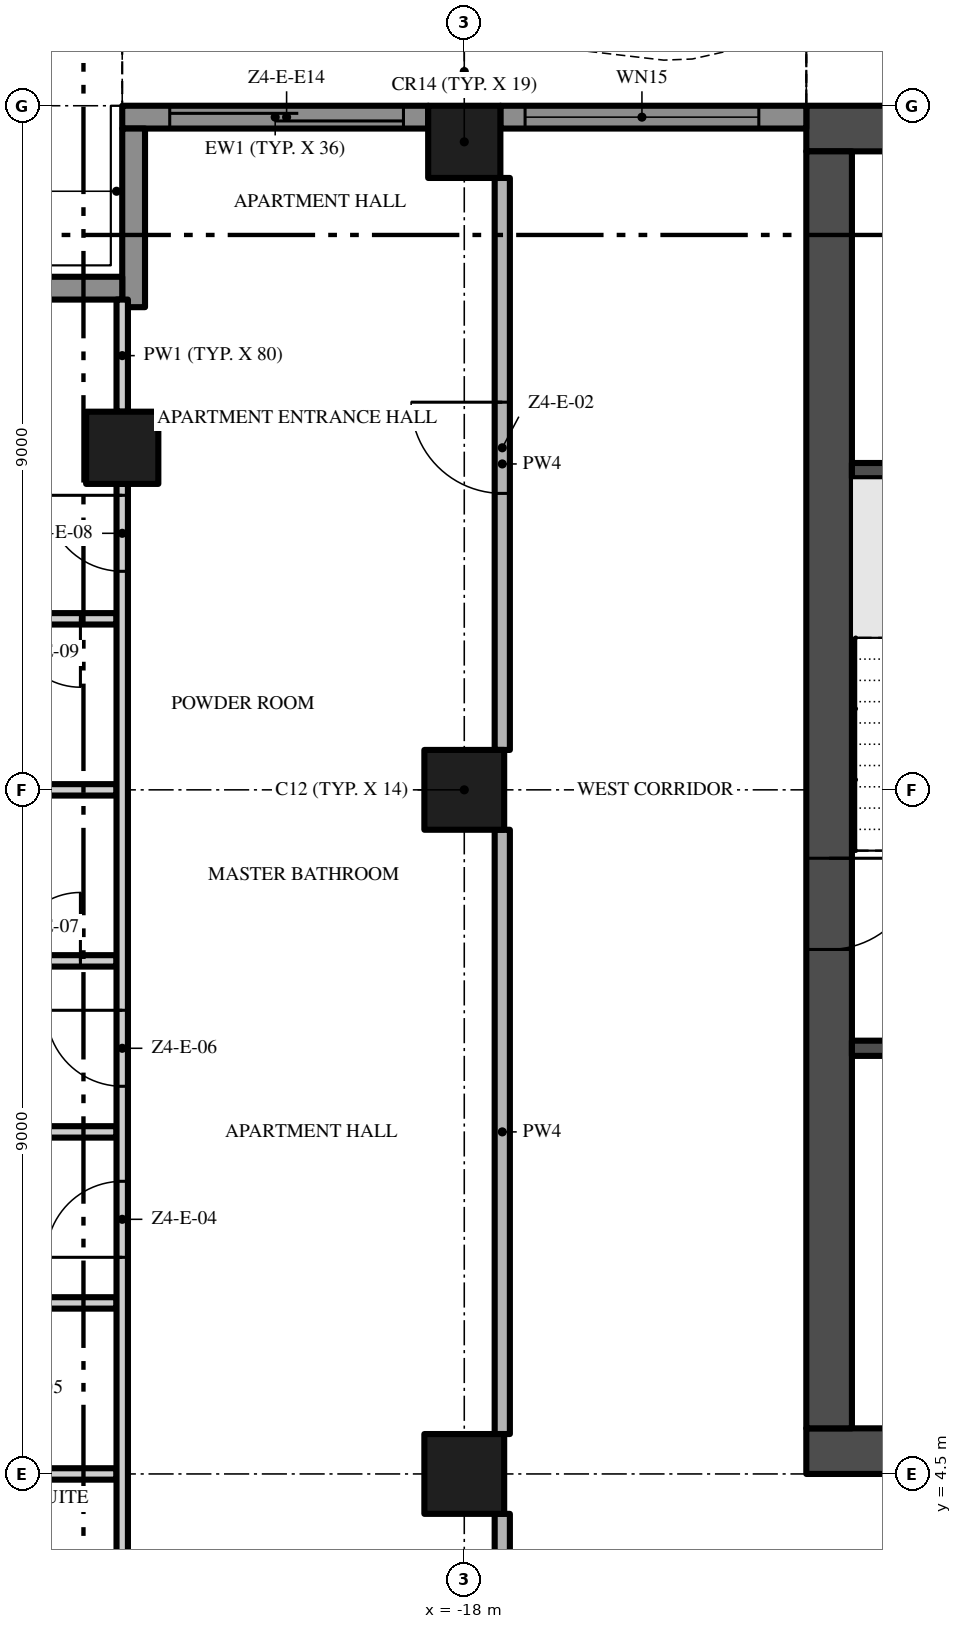
"""IFC4 building model, lengths in metres.
Left out: names, types, materials, properties, quantities, classifications, styles, units other than length and angle.
Written with IfcOpenShell. Run it as: python <this file> out.ifc"""

import sys

from ifc_helpers import new_model, si_unit, direction, frame, frame_2d, origin, origin_2d, place, context, subcontext, project, spatial, polyline, rectangle, outline, extrude, element, fill, save


model = new_model("IFC4")
c1 = context("Model", 3, precision=1e-05, world=origin(), true_north=direction((0.0, 1.0)))
c2 = subcontext(c1, "Body", "Model", "MODEL_VIEW")
j1 = project(units=[si_unit("LENGTHUNIT", "METRE"), si_unit("PLANEANGLEUNIT", "RADIAN")], contexts=[c1])
p1 = place(None, origin())
s1 = spatial("IfcSite", under=j1, at=p1, CompositionType="ELEMENT")
p2 = place(p1, origin())
s2 = spatial("IfcBuilding", under=s1, at=p2, CompositionType="ELEMENT")
p3 = place(p2, frame((0.0, 0.0, 230.0)))
s3 = spatial("IfcBuildingStorey", under=s2, at=p3, CompositionType="ELEMENT", Elevation=230.0)
p4 = place(p3, frame((-13.5, 4.8, -0.3), z_axis=(0.0, 0.0, 1.0), x_axis=(1.0, 0.0, 0.0)))
e1 = element("IfcWall", 1, at=p4, inside=s3, PredefinedType="SHEAR", context=c2, shape_type="SweptSolid", body=[
    extrude(rectangle(XDim=27.0, YDim=0.6, at=frame_2d((13.5, 0.0))), origin(), (0.0, 0.0, 1.0), 3.8),
])
p5 = place(p4, frame((12.0, 0.0, 0.3)))
e2 = element("IfcOpeningElement", 2, at=p5, cuts=e1, PredefinedType="OPENING", context=c2, shape_type="SweptSolid", body=[
    extrude(rectangle(XDim=3.0, YDim=2.4, at=frame_2d((1.5, 1.2))), frame((0.0, 0.31, 0.0), z_axis=(0.0, -1.0, 0.0), x_axis=(1.0, 0.0, 0.0)), (0.0, 0.0, 1.0), 0.62),
])
p6 = place(p4, frame((4.9, 0.0, 0.3)))
e3 = element("IfcOpeningElement", 3, at=p6, cuts=e1, PredefinedType="OPENING", context=c2, shape_type="SweptSolid", body=[
    extrude(rectangle(XDim=1.2, YDim=2.2, at=frame_2d((0.6, 1.1))), frame((0.0, 0.31, 0.0), z_axis=(0.0, -1.0, 0.0), x_axis=(1.0, 0.0, 0.0)), (0.0, 0.0, 1.0), 0.62),
])
p7 = place(p4, frame((20.75, 0.0, 0.3)))
e4 = element("IfcOpeningElement", 4, at=p7, cuts=e1, PredefinedType="OPENING", context=c2, shape_type="SweptSolid", body=[
    extrude(rectangle(XDim=1.5, YDim=2.2, at=frame_2d((0.75, 1.1))), frame((0.0, 0.31, 0.0), z_axis=(0.0, -1.0, 0.0), x_axis=(1.0, 0.0, 0.0)), (0.0, 0.0, 1.0), 0.62),
])
p8 = place(p4, frame((17.4, 0.0, 0.3)))
e5 = element("IfcOpeningElement", 5, at=p8, cuts=e1, PredefinedType="OPENING", context=c2, shape_type="SweptSolid", body=[
    extrude(rectangle(XDim=1.2, YDim=2.2, at=frame_2d((0.6, 1.1))), frame((0.0, 0.31, 0.0), z_axis=(0.0, -1.0, 0.0), x_axis=(1.0, 0.0, 0.0)), (0.0, 0.0, 1.0), 0.62),
])
p9 = place(p3, frame((13.5, 22.2, -0.3), z_axis=(0.0, 0.0, 1.0), x_axis=(-1.0, 0.0, 0.0)))
e6 = element("IfcWall", 6, at=p9, inside=s3, PredefinedType="SHEAR", context=c2, shape_type="SweptSolid", body=[
    extrude(rectangle(XDim=27.0, YDim=0.6, at=frame_2d((13.5, 0.0))), origin(), (0.0, 0.0, 1.0), 3.8),
])
p10 = place(p3, frame((-13.2, 21.9, -0.3), z_axis=(0.0, 0.0, 1.0), x_axis=(0.0, -1.0, 0.0)))
e7 = element("IfcWall", 7, at=p10, inside=s3, PredefinedType="SHEAR", context=c2, shape_type="SweptSolid", body=[
    extrude(rectangle(XDim=16.8, YDim=0.6, at=frame_2d((8.4, 0.0))), origin(), (0.0, 0.0, 1.0), 3.8),
])
p11 = place(p10, frame((9.3, 0.0, 0.3)))
e8 = element("IfcOpeningElement", 8, at=p11, cuts=e7, PredefinedType="OPENING", context=c2, shape_type="SweptSolid", body=[
    extrude(rectangle(XDim=1.2, YDim=2.2, at=frame_2d((0.6, 1.1))), frame((0.0, 0.31, 0.0), z_axis=(0.0, -1.0, 0.0), x_axis=(1.0, 0.0, 0.0)), (0.0, 0.0, 1.0), 0.62),
])
p12 = place(p3, frame((-18.0, 13.5, 0.0), z_axis=(0.0, 0.0, 1.0), x_axis=(1.0, 0.0, 0.0)))
e9 = element("IfcColumn", 9, at=p12, inside=s3, PredefinedType="COLUMN", context=c2, shape_type="SweptSolid", body=[
    extrude(rectangle(XDim=1.05, YDim=1.05, at=origin_2d()), origin(), (0.0, 0.0, 1.0), 3.5),
])
p13 = place(p3, frame((-18.0, 22.025, 0.0), z_axis=(0.0, 0.0, 1.0), x_axis=(1.0, 0.0, 0.0)))
e10 = element("IfcColumn", 10, at=p13, inside=s3, PredefinedType="COLUMN", context=c2, shape_type="SweptSolid", body=[
    extrude(rectangle(XDim=0.95, YDim=0.95, at=origin_2d()), origin(), (0.0, 0.0, 1.0), 3.5),
])
p14 = place(p3, frame((-18.0, 4.5, 0.0), z_axis=(0.0, 0.0, 1.0), x_axis=(1.0, 0.0, 0.0)))
e11 = element("IfcColumn", 11, at=p14, inside=s3, PredefinedType="COLUMN", context=c2, shape_type="SweptSolid", body=[
    extrude(rectangle(XDim=1.05, YDim=1.05, at=origin_2d()), origin(), (0.0, 0.0, 1.0), 3.5),
])
p15 = place(p3, frame((-22.5, 18.0, 0.0), z_axis=(0.0, 0.0, 1.0), x_axis=(1.0, 0.0, 0.0)))
e12 = element("IfcColumn", 12, at=p15, inside=s3, PredefinedType="COLUMN", context=c2, shape_type="SweptSolid", body=[
    extrude(rectangle(XDim=0.95, YDim=0.95, at=origin_2d()), origin(), (0.0, 0.0, 1.0), 3.5),
])
p16 = place(p3, frame((-17.525, 22.35, 0.0), z_axis=(0.0, 0.0, 1.0), x_axis=(1.0, 0.0, 0.0)))
e13 = element("IfcWall", 13, at=p16, inside=s3, PredefinedType="SOLIDWALL", context=c2, shape_type="SweptSolid", body=[
    extrude(rectangle(XDim=4.025, YDim=0.3, at=frame_2d((2.013, 0.0))), origin(), (0.0, 0.0, 1.0), 3.5),
])
p17 = place(p16, frame((0.325, 0.0, 0.45)))
e14 = element("IfcOpeningElement", 14, at=p17, cuts=e13, PredefinedType="OPENING", context=c2, shape_type="SweptSolid", body=[
    extrude(rectangle(XDim=3.075, YDim=2.65, at=frame_2d((1.538, 1.325))), frame((0.0, 0.16, 0.0), z_axis=(0.0, -1.0, 0.0), x_axis=(1.0, 0.0, 0.0)), (0.0, 0.0, 1.0), 0.32),
])
p18 = place(p3, frame((-22.5, 22.35, 0.0), z_axis=(0.0, 0.0, 1.0), x_axis=(1.0, 0.0, 0.0)))
e15 = element("IfcWall", 15, at=p18, inside=s3, PredefinedType="SOLIDWALL", context=c2, shape_type="SweptSolid", body=[
    extrude(rectangle(XDim=4.025, YDim=0.3, at=frame_2d((2.013, 0.0))), origin(), (0.0, 0.0, 1.0), 3.5),
])
p19 = place(p18, frame((0.625, 0.0, 0.0)))
e16 = element("IfcOpeningElement", 16, at=p19, cuts=e15, PredefinedType="OPENING", context=c2, shape_type="SweptSolid", body=[
    extrude(rectangle(XDim=3.075, YDim=2.4, at=frame_2d((1.538, 1.2))), frame((0.0, 0.16, 0.0), z_axis=(0.0, -1.0, 0.0), x_axis=(1.0, 0.0, 0.0)), (0.0, 0.0, 1.0), 0.32),
])
p20 = place(p3, frame((-22.35, 19.85, 0.0), z_axis=(0.0, 0.0, 1.0), x_axis=(0.0, 1.0, 0.0)))
e17 = element("IfcWall", 17, at=p20, inside=s3, PredefinedType="SOLIDWALL", context=c2, shape_type="SweptSolid", body=[
    extrude(rectangle(XDim=2.35, YDim=0.3, at=frame_2d((1.175, 0.0))), origin(), (0.0, 0.0, 1.0), 3.5),
])
p21 = place(p3, frame((-24.75, 20.1, 0.0), z_axis=(0.0, 0.0, 1.0), x_axis=(1.0, 0.0, 0.0)))
e18 = element("IfcWall", 18, at=p21, inside=s3, PredefinedType="SOLIDWALL", context=c2, shape_type="SweptSolid", body=[
    extrude(rectangle(XDim=2.25, YDim=0.3, at=frame_2d((1.125, 0.0))), origin(), (0.0, 0.0, 1.0), 3.5),
])
p22 = place(p3, origin())
e19 = element("IfcWall", 19, at=p22, inside=s3, PredefinedType="USERDEFINED", context=c2, shape_type="SweptSolid", body=[
    extrude(outline(polyline([(-13.5, 23.451), (-15.0, 23.115), (-15.375, 23.1), (-16.5, 23.231), (-18.0, 23.755), (-19.5, 24.488), (-21.0, 25.149), (-22.5, 25.485), (-22.555, 25.241), (-21.079, 24.91), (-19.605, 24.261), (-18.096, 23.524), (-16.556, 22.986), (-15.385, 22.849), (-14.967, 22.866), (-13.445, 23.208), (-13.5, 23.451)])), origin(), (0.0, 0.0, 1.0), 0.9),
])
for number, where, z_axis, x_axis in (
    (20, (-12.9, 10.1, 0.0), (0.0, 0.0, 1.0), (1.0, 0.0, 0.0)),
    (21, (-12.9, 17.7, 0.0), (0.0, 0.0, 1.0), (1.0, 0.0, 0.0)),
):
    element("IfcWall", number, at=place(p3, frame(where, z_axis=z_axis, x_axis=x_axis)), inside=s3, PredefinedType="SHEAR", context=c2, shape_type="SweptSolid", body=[
        extrude(rectangle(XDim=3.25, YDim=0.2, at=frame_2d((1.625, 0.0))), origin(), (0.0, 0.0, 1.0), 3.5),
    ])
p23 = place(p3, frame((-26.05, 4.5, 0.0), z_axis=(0.0, 0.0, 1.0), x_axis=(1.0, 0.0, 0.0)))
e22 = element("IfcWall", 22, at=p23, inside=s3, PredefinedType="PARTITIONING", context=c2, shape_type="SweptSolid", body=[
    extrude(rectangle(XDim=3.475, YDim=0.15, at=frame_2d((1.738, 0.0))), origin(), (0.0, 0.0, 1.0), 3.5),
])
p24 = place(p3, frame((-24.45, 6.75, 0.0), z_axis=(0.0, 0.0, 1.0), x_axis=(1.0, 0.0, 0.0)))
e23 = element("IfcWall", 23, at=p24, inside=s3, PredefinedType="PARTITIONING", context=c2, shape_type="SweptSolid", body=[
    extrude(rectangle(XDim=1.875, YDim=0.15, at=frame_2d((0.938, 0.0))), origin(), (0.0, 0.0, 1.0), 3.5),
])
p25 = place(p3, frame((-26.7, 9.0, 0.0), z_axis=(0.0, 0.0, 1.0), x_axis=(1.0, 0.0, 0.0)))
e24 = element("IfcWall", 24, at=p25, inside=s3, PredefinedType="PARTITIONING", context=c2, shape_type="SweptSolid", body=[
    extrude(rectangle(XDim=4.125, YDim=0.15, at=frame_2d((2.062, 0.0))), origin(), (0.0, 0.0, 1.0), 3.5),
])
p26 = place(p3, frame((-24.45, 11.25, 0.0), z_axis=(0.0, 0.0, 1.0), x_axis=(1.0, 0.0, 0.0)))
e25 = element("IfcWall", 25, at=p26, inside=s3, PredefinedType="PARTITIONING", context=c2, shape_type="SweptSolid", body=[
    extrude(rectangle(XDim=1.875, YDim=0.15, at=frame_2d((0.938, 0.0))), origin(), (0.0, 0.0, 1.0), 3.5),
])
p27 = place(p26, frame((0.5, 0.0, 0.0)))
e26 = element("IfcOpeningElement", 26, at=p27, cuts=e25, PredefinedType="OPENING", context=c2, shape_type="SweptSolid", body=[
    extrude(rectangle(XDim=0.9, YDim=2.1, at=frame_2d((0.45, 1.05))), frame((0.0, 0.085, 0.0), z_axis=(0.0, -1.0, 0.0), x_axis=(1.0, 0.0, 0.0)), (0.0, 0.0, 1.0), 0.17),
])
p28 = place(p3, frame((-24.45, 13.5, 0.0), z_axis=(0.0, 0.0, 1.0), x_axis=(1.0, 0.0, 0.0)))
e27 = element("IfcWall", 27, at=p28, inside=s3, PredefinedType="PARTITIONING", context=c2, shape_type="SweptSolid", body=[
    extrude(rectangle(XDim=1.875, YDim=0.15, at=frame_2d((0.938, 0.0))), origin(), (0.0, 0.0, 1.0), 3.5),
])
p29 = place(p3, frame((-22.575, 15.75, 0.0), z_axis=(0.0, 0.0, 1.0), x_axis=(-1.0, 0.0, 0.0)))
e28 = element("IfcWall", 28, at=p29, inside=s3, PredefinedType="PARTITIONING", context=c2, shape_type="SweptSolid", body=[
    extrude(rectangle(XDim=1.875, YDim=0.15, at=frame_2d((0.938, 0.0))), origin(), (0.0, 0.0, 1.0), 3.5),
])
p30 = place(p29, frame((0.475, 0.0, 0.0)))
e29 = element("IfcOpeningElement", 29, at=p30, cuts=e28, PredefinedType="OPENING", context=c2, shape_type="SweptSolid", body=[
    extrude(rectangle(XDim=0.9, YDim=2.1, at=frame_2d((0.45, 1.05))), frame((0.0, 0.085, 0.0), z_axis=(0.0, -1.0, 0.0), x_axis=(1.0, 0.0, 0.0)), (0.0, 0.0, 1.0), 0.17),
])
p31 = place(p3, frame((-22.5, 0.1, 0.0), z_axis=(0.0, 0.0, 1.0), x_axis=(0.0, 1.0, 0.0)))
e30 = element("IfcWall", 30, at=p31, inside=s3, PredefinedType="PARTITIONING", context=c2, shape_type="SweptSolid", body=[
    extrude(rectangle(XDim=17.425, YDim=0.15, at=frame_2d((8.713, 0.0))), origin(), (0.0, 0.0, 1.0), 3.5),
])
p32 = place(p31, frame((1.65, 0.0, 0.0)))
e31 = element("IfcOpeningElement", 31, at=p32, cuts=e30, PredefinedType="OPENING", context=c2, shape_type="SweptSolid", body=[
    extrude(rectangle(XDim=1.0, YDim=2.4, at=frame_2d((0.5, 1.2))), frame((0.0, 0.085, 0.0), z_axis=(0.0, -1.0, 0.0), x_axis=(1.0, 0.0, 0.0)), (0.0, 0.0, 1.0), 0.17),
])
p33 = place(p31, frame((7.25, 0.0, 0.0)))
e32 = element("IfcOpeningElement", 32, at=p33, cuts=e30, PredefinedType="OPENING", context=c2, shape_type="SweptSolid", body=[
    extrude(rectangle(XDim=1.0, YDim=2.4, at=frame_2d((0.5, 1.2))), frame((0.0, 0.085, 0.0), z_axis=(0.0, -1.0, 0.0), x_axis=(1.0, 0.0, 0.0)), (0.0, 0.0, 1.0), 0.17),
])
p34 = place(p31, frame((9.5, 0.0, 0.0)))
e33 = element("IfcOpeningElement", 33, at=p34, cuts=e30, PredefinedType="OPENING", context=c2, shape_type="SweptSolid", body=[
    extrude(rectangle(XDim=1.0, YDim=2.4, at=frame_2d((0.5, 1.2))), frame((0.0, 0.085, 0.0), z_axis=(0.0, -1.0, 0.0), x_axis=(1.0, 0.0, 0.0)), (0.0, 0.0, 1.0), 0.17),
])
p35 = place(p31, frame((16.275, 0.0, 0.0)))
e34 = element("IfcOpeningElement", 34, at=p35, cuts=e30, PredefinedType="OPENING", context=c2, shape_type="SweptSolid", body=[
    extrude(rectangle(XDim=1.0, YDim=2.4, at=frame_2d((0.5, 1.2))), frame((0.0, 0.085, 0.0), z_axis=(0.0, -1.0, 0.0), x_axis=(1.0, 0.0, 0.0)), (0.0, 0.0, 1.0), 0.17),
])
p36 = place(p3, frame((-22.5, 18.475, 0.0), z_axis=(0.0, 0.0, 1.0), x_axis=(0.0, 1.0, 0.0)))
e35 = element("IfcWall", 35, at=p36, inside=s3, PredefinedType="PARTITIONING", context=c2, shape_type="SweptSolid", body=[
    extrude(rectangle(XDim=1.475, YDim=0.15, at=frame_2d((0.738, 0.0))), origin(), (0.0, 0.0, 1.0), 3.5),
])
p37 = place(p3, frame((-17.5, -0.2, 0.0), z_axis=(0.0, 0.0, 1.0), x_axis=(0.0, 1.0, 0.0)))
e36 = element("IfcWall", 36, at=p37, inside=s3, PredefinedType="PARTITIONING", context=c2, shape_type="SweptSolid", body=[
    extrude(rectangle(XDim=4.175, YDim=0.2, at=frame_2d((2.087, 0.0))), origin(), (0.0, 0.0, 1.0), 3.5),
])
p38 = place(p3, frame((-17.5, 5.025, 0.0), z_axis=(0.0, 0.0, 1.0), x_axis=(0.0, 1.0, 0.0)))
e37 = element("IfcWall", 37, at=p38, inside=s3, PredefinedType="PARTITIONING", context=c2, shape_type="SweptSolid", body=[
    extrude(rectangle(XDim=7.95, YDim=0.2, at=frame_2d((3.975, 0.0))), origin(), (0.0, 0.0, 1.0), 3.5),
])
p39 = place(p3, frame((-17.5, 14.025, 0.0), z_axis=(0.0, 0.0, 1.0), x_axis=(0.0, 1.0, 0.0)))
e38 = element("IfcWall", 38, at=p39, inside=s3, PredefinedType="PARTITIONING", context=c2, shape_type="SweptSolid", body=[
    extrude(rectangle(XDim=7.525, YDim=0.2, at=frame_2d((3.763, 0.0))), origin(), (0.0, 0.0, 1.0), 3.5),
])
p40 = place(p39, frame((3.375, 0.0, 0.0)))
e39 = element("IfcOpeningElement", 39, at=p40, cuts=e38, PredefinedType="OPENING", context=c2, shape_type="SweptSolid", body=[
    extrude(rectangle(XDim=1.2, YDim=2.4, at=frame_2d((0.6, 1.2))), frame((0.0, 0.11, 0.0), z_axis=(0.0, -1.0, 0.0), x_axis=(1.0, 0.0, 0.0)), (0.0, 0.0, 1.0), 0.22),
])
p41 = place(p17, origin())
e40 = element("IfcWindow", 40, at=p41, inside=s3, PartitioningType="SINGLE_PANEL", PredefinedType="WINDOW", context=c2, shape_type="SweptSolid", body=[
    extrude(rectangle(XDim=3.075, YDim=2.65, at=frame_2d((1.538, 1.325))), frame((0.0, 0.03, 0.0), z_axis=(0.0, -1.0, 0.0), x_axis=(1.0, 0.0, 0.0)), (0.0, 0.0, 1.0), 0.06),
])
fill(e14, e40)
p42 = place(p19, origin())
e41 = element("IfcDoor", 41, at=p42, inside=s3, OperationType="SINGLE_SWING_LEFT", PredefinedType="DOOR", context=c2, shape_type="SweptSolid", body=[
    extrude(rectangle(XDim=3.075, YDim=2.4, at=frame_2d((1.538, 1.2))), frame((0.0, 0.025, 0.0), z_axis=(0.0, -1.0, 0.0), x_axis=(1.0, 0.0, 0.0)), (0.0, 0.0, 1.0), 0.05),
])
fill(e16, e41)
p43 = place(p11, frame((1.2, 0.0, 0.0), z_axis=(0.0, 0.0, 1.0), x_axis=(-1.0, 0.0, 0.0)))
e42 = element("IfcDoor", 42, at=p43, inside=s3, OperationType="SINGLE_SWING_RIGHT", PredefinedType="DOOR", context=c2, shape_type="SweptSolid", body=[
    extrude(rectangle(XDim=1.2, YDim=2.2, at=frame_2d((0.6, 1.1))), frame((0.0, 0.025, 0.0), z_axis=(0.0, -1.0, 0.0), x_axis=(1.0, 0.0, 0.0)), (0.0, 0.0, 1.0), 0.05),
])
fill(e8, e42)
p44 = place(p40, origin())
e43 = element("IfcDoor", 43, at=p44, inside=s3, OperationType="SINGLE_SWING_RIGHT", PredefinedType="DOOR", context=c2, shape_type="SweptSolid", body=[
    extrude(rectangle(XDim=1.2, YDim=2.4, at=frame_2d((0.6, 1.2))), frame((0.0, 0.025, 0.0), z_axis=(0.0, -1.0, 0.0), x_axis=(1.0, 0.0, 0.0)), (0.0, 0.0, 1.0), 0.05),
])
fill(e39, e43)
p45 = place(p33, origin())
e44 = element("IfcDoor", 44, at=p45, inside=s3, OperationType="SINGLE_SWING_LEFT", PredefinedType="DOOR", context=c2, shape_type="SweptSolid", body=[
    extrude(rectangle(XDim=1.0, YDim=2.4, at=frame_2d((0.5, 1.2))), frame((0.0, 0.025, 0.0), z_axis=(0.0, -1.0, 0.0), x_axis=(1.0, 0.0, 0.0)), (0.0, 0.0, 1.0), 0.05),
])
fill(e32, e44)
p46 = place(p34, origin())
e45 = element("IfcDoor", 45, at=p46, inside=s3, OperationType="SINGLE_SWING_RIGHT", PredefinedType="DOOR", context=c2, shape_type="SweptSolid", body=[
    extrude(rectangle(XDim=1.0, YDim=2.4, at=frame_2d((0.5, 1.2))), frame((0.0, 0.025, 0.0), z_axis=(0.0, -1.0, 0.0), x_axis=(1.0, 0.0, 0.0)), (0.0, 0.0, 1.0), 0.05),
])
fill(e33, e45)
p47 = place(p27, origin())
e46 = element("IfcDoor", 46, at=p47, inside=s3, OperationType="SINGLE_SWING_RIGHT", PredefinedType="DOOR", context=c2, shape_type="SweptSolid", body=[
    extrude(rectangle(XDim=0.9, YDim=2.1, at=frame_2d((0.45, 1.05))), frame((0.0, 0.025, 0.0), z_axis=(0.0, -1.0, 0.0), x_axis=(1.0, 0.0, 0.0)), (0.0, 0.0, 1.0), 0.05),
])
fill(e26, e46)
p48 = place(p35, origin())
e47 = element("IfcDoor", 47, at=p48, inside=s3, OperationType="SINGLE_SWING_RIGHT", PredefinedType="DOOR", context=c2, shape_type="SweptSolid", body=[
    extrude(rectangle(XDim=1.0, YDim=2.4, at=frame_2d((0.5, 1.2))), frame((0.0, 0.025, 0.0), z_axis=(0.0, -1.0, 0.0), x_axis=(1.0, 0.0, 0.0)), (0.0, 0.0, 1.0), 0.05),
])
fill(e34, e47)
p49 = place(p30, origin())
e48 = element("IfcDoor", 48, at=p49, inside=s3, OperationType="SINGLE_SWING_LEFT", PredefinedType="DOOR", context=c2, shape_type="SweptSolid", body=[
    extrude(rectangle(XDim=0.9, YDim=2.1, at=frame_2d((0.45, 1.05))), frame((0.0, 0.025, 0.0), z_axis=(0.0, -1.0, 0.0), x_axis=(1.0, 0.0, 0.0)), (0.0, 0.0, 1.0), 0.05),
])
fill(e29, e48)
save(model, sys.argv[1])
